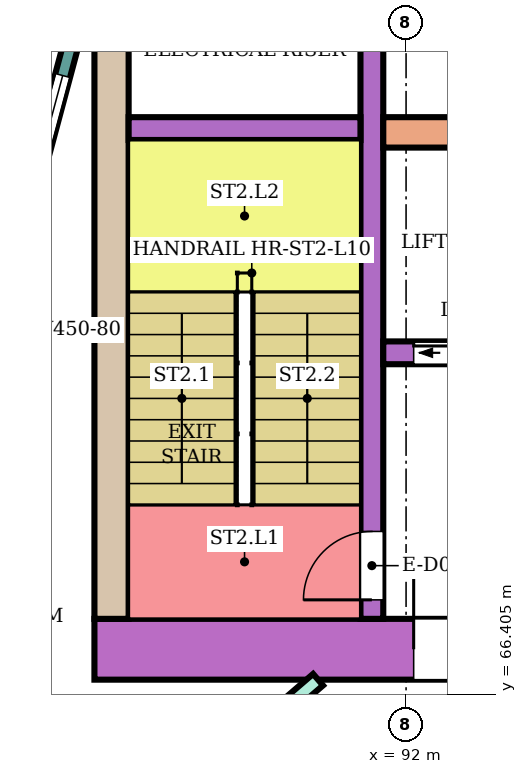
"""IFC4 building model, lengths in metres.
Left out: names, types, materials, properties, quantities, classifications, styles, units other than length and angle.
Written with IfcOpenShell. Run it as: python <this file> out.ifc"""

import sys

from ifc_helpers import new_model, si_unit, direction, frame, frame_2d, origin, place, context, subcontext, project, spatial, rectangle, extrude, element, fill, save


model = new_model("IFC4")
c1 = context("Model", 3, precision=1e-05, world=origin(), true_north=direction((0.0, 1.0)))
c2 = subcontext(c1, "Body", "Model", "MODEL_VIEW")
j1 = project(units=[si_unit("LENGTHUNIT", "METRE"), si_unit("PLANEANGLEUNIT", "RADIAN")], contexts=[c1])
p1 = place(None, origin())
s1 = spatial("IfcSite", under=j1, at=p1, CompositionType="ELEMENT")
p2 = place(p1, origin())
s2 = spatial("IfcBuilding", under=s1, at=p2, CompositionType="ELEMENT")
p3 = place(p2, frame((0.0, 0.0, 47.8)))
s3 = spatial("IfcBuildingStorey", under=s2, at=p3, CompositionType="ELEMENT", Elevation=47.8)
p4 = place(p3, frame((87.9, 67.0, 0.0), z_axis=(0.0, 0.0, 1.0), x_axis=(1.0, 0.0, 0.0)))
e1 = element("IfcWall", 1, at=p4, inside=s3, PredefinedType="SHEAR", context=c2, shape_type="SweptSolid", body=[
    extrude(rectangle(XDim=14.7, YDim=0.8, at=frame_2d((7.35, 0.0))), origin(), (0.0, 0.0, 1.0), 3.48),
])
p5 = place(p4, frame((4.2, 0.0, 0.0)))
e2 = element("IfcOpeningElement", 2, at=p5, cuts=e1, PredefinedType="OPENING", context=c2, shape_type="SweptSolid", body=[
    extrude(rectangle(XDim=2.4, YDim=2.4, at=frame_2d((1.2, 1.2))), frame((0.0, 0.41, 0.0), z_axis=(0.0, -1.0, 0.0), x_axis=(1.0, 0.0, 0.0)), (0.0, 0.0, 1.0), 0.82),
])
p6 = place(p3, frame((88.125, 67.4, 0.0), z_axis=(0.0, 0.0, 1.0), x_axis=(0.0, 1.0, 0.0)))
e3 = element("IfcWall", 3, at=p6, inside=s3, PredefinedType="SHEAR", context=c2, shape_type="SweptSolid", body=[
    extrude(rectangle(XDim=7.6, YDim=0.45, at=frame_2d((3.8, 0.0))), origin(), (0.0, 0.0, 1.0), 3.48),
])
p7 = place(p3, frame((91.55, 67.4, 0.0), z_axis=(0.0, 0.0, 1.0), x_axis=(0.0, 1.0, 0.0)))
e4 = element("IfcWall", 4, at=p7, inside=s3, PredefinedType="SHEAR", context=c2, shape_type="SweptSolid", body=[
    extrude(rectangle(XDim=7.6, YDim=0.3, at=frame_2d((3.8, 0.0))), origin(), (0.0, 0.0, 1.0), 3.48),
])
p8 = place(p7, frame((0.25, 0.0, 0.0)))
e5 = element("IfcOpeningElement", 5, at=p8, cuts=e4, PredefinedType="OPENING", context=c2, shape_type="SweptSolid", body=[
    extrude(rectangle(XDim=0.9, YDim=2.1, at=frame_2d((0.45, 1.05))), frame((0.0, 0.16, 0.0), z_axis=(0.0, -1.0, 0.0), x_axis=(1.0, 0.0, 0.0)), (0.0, 0.0, 1.0), 0.32),
])
p9 = place(p3, frame((88.35, 73.85, 0.0), z_axis=(0.0, 0.0, 1.0), x_axis=(1.0, 0.0, 0.0)))
e6 = element("IfcWall", 6, at=p9, inside=s3, PredefinedType="SHEAR", context=c2, shape_type="SweptSolid", body=[
    extrude(rectangle(XDim=3.05, YDim=0.3, at=frame_2d((1.525, 0.0))), origin(), (0.0, 0.0, 1.0), 3.48),
])
p10 = place(p3, frame((91.7, 73.8, 0.0), z_axis=(0.0, 0.0, 1.0), x_axis=(1.0, 0.0, 0.0)))
e7 = element("IfcWall", 7, at=p10, inside=s3, PredefinedType="SHEAR", context=c2, shape_type="SweptSolid", body=[
    extrude(rectangle(XDim=10.9, YDim=0.4, at=frame_2d((5.45, 0.0))), origin(), (0.0, 0.0, 1.0), 3.48),
])
p11 = place(p3, frame((91.7, 70.9, 0.0), z_axis=(0.0, 0.0, 1.0), x_axis=(1.0, 0.0, 0.0)))
e8 = element("IfcWall", 8, at=p11, inside=s3, PredefinedType="SHEAR", context=c2, shape_type="SweptSolid", body=[
    extrude(rectangle(XDim=10.9, YDim=0.3, at=frame_2d((5.45, 0.0))), origin(), (0.0, 0.0, 1.0), 3.48),
])
p12 = place(p11, frame((0.4, 0.0, 0.0)))
e9 = element("IfcOpeningElement", 9, at=p12, cuts=e8, PredefinedType="OPENING", context=c2, shape_type="SweptSolid", body=[
    extrude(rectangle(XDim=1.4, YDim=2.1, at=frame_2d((0.7, 1.05))), frame((0.0, 0.16, 0.0), z_axis=(0.0, -1.0, 0.0), x_axis=(1.0, 0.0, 0.0)), (0.0, 0.0, 1.0), 0.32),
])
p13 = place(p11, frame((5.4, 0.0, 0.0)))
e10 = element("IfcOpeningElement", 10, at=p13, cuts=e8, PredefinedType="OPENING", context=c2, shape_type="SweptSolid", body=[
    extrude(rectangle(XDim=1.4, YDim=2.1, at=frame_2d((0.7, 1.05))), frame((0.0, 0.16, 0.0), z_axis=(0.0, -1.0, 0.0), x_axis=(1.0, 0.0, 0.0)), (0.0, 0.0, 1.0), 0.32),
])
p14 = place(p11, frame((8.1, 0.0, 0.0)))
e11 = element("IfcOpeningElement", 11, at=p14, cuts=e8, PredefinedType="OPENING", context=c2, shape_type="SweptSolid", body=[
    extrude(rectangle(XDim=1.0, YDim=2.1, at=frame_2d((0.5, 1.05))), frame((0.0, 0.16, 0.0), z_axis=(0.0, -1.0, 0.0), x_axis=(1.0, 0.0, 0.0)), (0.0, 0.0, 1.0), 0.32),
])
p15 = place(p3, frame((86.585, 71.198, 0.0), z_axis=(0.0, 0.0, 1.0), x_axis=(0.258789828301, 0.965933654434, 0.0)))
e12 = element("IfcWall", 12, at=p15, inside=s3, PredefinedType="NOTDEFINED", context=c2, shape_type="SweptSolid", body=[
    extrude(rectangle(XDim=3.936, YDim=0.2, at=frame_2d((1.968, 0.0))), origin(), (0.0, 0.0, 1.0), 3.8),
])
p16 = place(p15, frame((0.468, 0.0, 0.9)))
e13 = element("IfcOpeningElement", 13, at=p16, cuts=e12, PredefinedType="OPENING", context=c2, shape_type="SweptSolid", body=[
    extrude(rectangle(XDim=3.0, YDim=2.3, at=frame_2d((1.5, 1.15))), frame((0.0, 0.11, 0.0), z_axis=(0.0, -1.0, 0.0), x_axis=(1.0, 0.0, 0.0)), (0.0, 0.0, 1.0), 0.22),
])
p17 = place(p3, frame((86.877, 63.189, 0.0), z_axis=(0.0, 0.0, 1.0), x_axis=(0.758164888471, 0.652062881853, 0.0)))
e14 = element("IfcWall", 14, at=p17, inside=s3, PredefinedType="PARTITIONING", context=c2, shape_type="SweptSolid", body=[
    extrude(rectangle(XDim=5.23, YDim=0.2, at=frame_2d((2.615, 0.0))), origin(), (0.0, 0.0, 1.0), 3.35),
])
p18 = place(p17, frame((2.63, 0.0, 0.0)))
e15 = element("IfcOpeningElement", 15, at=p18, cuts=e14, PredefinedType="OPENING", context=c2, shape_type="SweptSolid", body=[
    extrude(rectangle(XDim=1.0, YDim=2.1, at=frame_2d((0.5, 1.05))), frame((0.0, 0.11, 0.0), z_axis=(0.0, -1.0, 0.0), x_axis=(1.0, 0.0, 0.0)), (0.0, 0.0, 1.0), 0.22),
])
p19 = place(p3, frame((86.643, 66.681, 0.0), z_axis=(0.0, 0.0, 1.0), x_axis=(0.652264876065, -0.757991115682, 0.0)))
e16 = element("IfcWall", 16, at=p19, inside=s3, PredefinedType="PARTITIONING", context=c2, shape_type="SweptSolid", body=[
    extrude(rectangle(XDim=2.699, YDim=0.1, at=frame_2d((1.35, 0.0))), origin(), (0.0, 0.0, 1.0), 3.35),
])
p20 = place(p19, frame((1.3, 0.0, 0.0)))
e17 = element("IfcOpeningElement", 17, at=p20, cuts=e16, PredefinedType="OPENING", context=c2, shape_type="SweptSolid", body=[
    extrude(rectangle(XDim=0.8, YDim=2.1, at=frame_2d((0.4, 1.05))), frame((0.0, 0.06, 0.0), z_axis=(0.0, -1.0, 0.0), x_axis=(1.0, 0.0, 0.0)), (0.0, 0.0, 1.0), 0.12),
])
p21 = place(p16, origin())
e18 = element("IfcWindow", 18, at=p21, inside=s3, PartitioningType="SINGLE_PANEL", PredefinedType="WINDOW", context=c2, shape_type="SweptSolid", body=[
    extrude(rectangle(XDim=3.0, YDim=2.3, at=frame_2d((1.5, 1.15))), frame((0.0, 0.03, 0.0), z_axis=(0.0, -1.0, 0.0), x_axis=(1.0, 0.0, 0.0)), (0.0, 0.0, 1.0), 0.06),
])
fill(e13, e18)
p22 = place(p8, origin())
e19 = element("IfcDoor", 19, at=p22, inside=s3, OperationType="SINGLE_SWING_LEFT", PredefinedType="DOOR", context=c2, shape_type="SweptSolid", body=[
    extrude(rectangle(XDim=0.9, YDim=2.1, at=frame_2d((0.45, 1.05))), frame((0.0, 0.025, 0.0), z_axis=(0.0, -1.0, 0.0), x_axis=(1.0, 0.0, 0.0)), (0.0, 0.0, 1.0), 0.05),
])
fill(e5, e19)
p23 = place(p12, origin())
e20 = element("IfcDoor", 20, at=p23, inside=s3, OperationType="DOUBLE_DOOR_SLIDING", PredefinedType="DOOR", context=c2, shape_type="SweptSolid", body=[
    extrude(rectangle(XDim=1.4, YDim=2.1, at=frame_2d((0.7, 1.05))), frame((0.0, 0.025, 0.0), z_axis=(0.0, -1.0, 0.0), x_axis=(1.0, 0.0, 0.0)), (0.0, 0.0, 1.0), 0.05),
])
fill(e9, e20)
p24 = place(p5, origin())
e21 = element("IfcDoor", 21, at=p24, inside=s3, OperationType="DOUBLE_DOOR_SINGLE_SWING", PredefinedType="DOOR", context=c2, shape_type="SweptSolid", body=[
    extrude(rectangle(XDim=2.4, YDim=2.4, at=frame_2d((1.2, 1.2))), frame((0.0, 0.025, 0.0), z_axis=(0.0, -1.0, 0.0), x_axis=(1.0, 0.0, 0.0)), (0.0, 0.0, 1.0), 0.05),
])
fill(e2, e21)
save(model, sys.argv[1])
